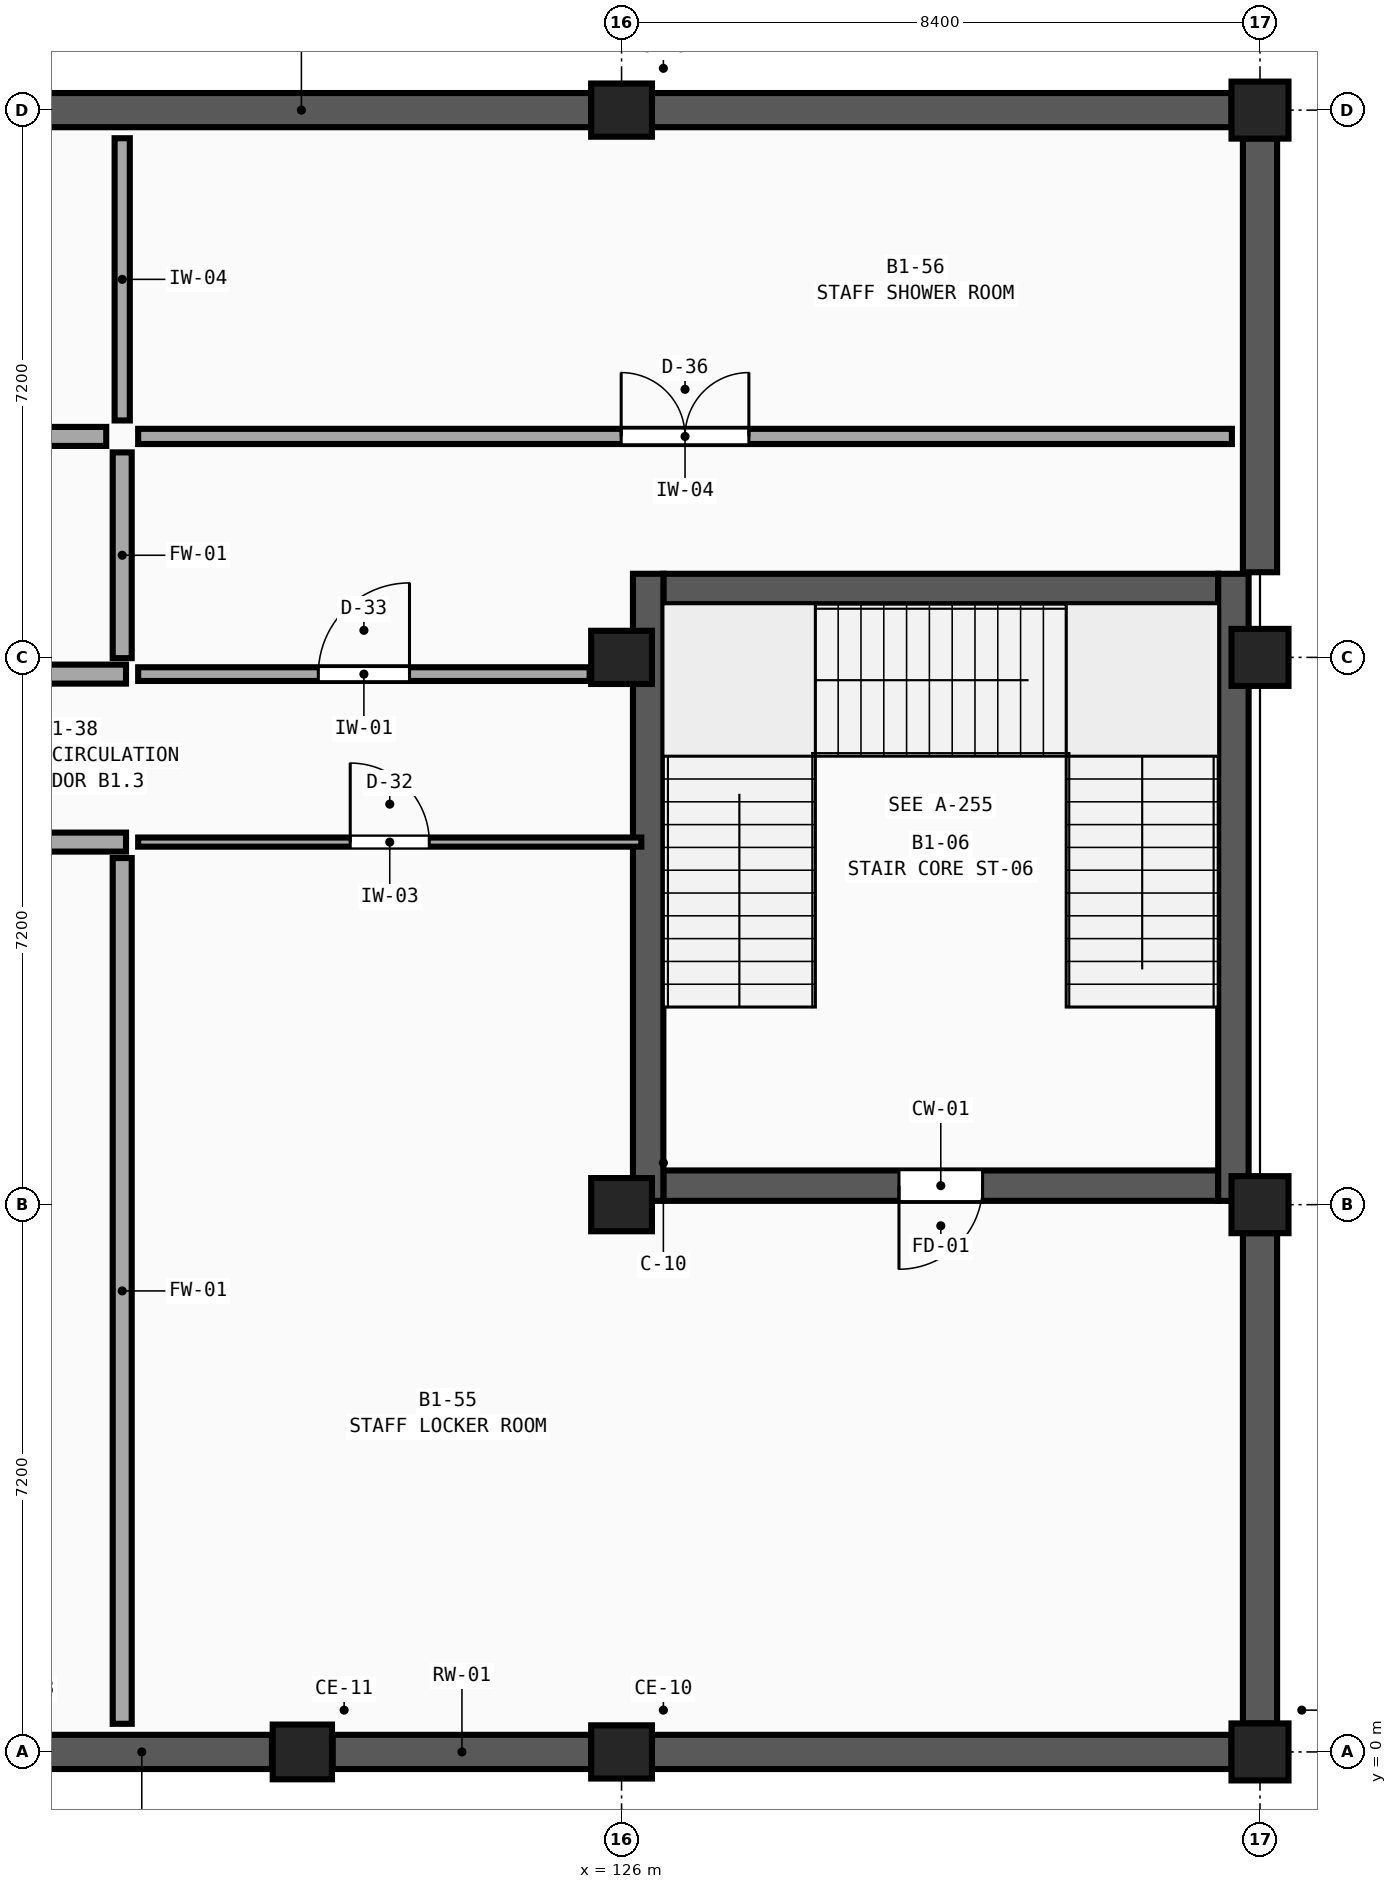
"""IFC4 building model, lengths in metres.
Left out: names, types, materials, properties, quantities, classifications, styles, units other than length and angle.
Written with IfcOpenShell. Run it as: python <this file> out.ifc"""

import sys

from ifc_helpers import new_model, si_unit, direction, frame, frame_2d, origin, origin_2d, place, context, subcontext, project, spatial, rectangle, extrude, element, fill, save


model = new_model("IFC4")
c1 = context("Model", 3, precision=1e-05, world=origin(), true_north=direction((0.0, 1.0)))
c2 = subcontext(c1, "Body", "Model", "MODEL_VIEW")
j1 = project(units=[si_unit("LENGTHUNIT", "METRE"), si_unit("PLANEANGLEUNIT", "RADIAN")], contexts=[c1])
p1 = place(None, origin())
s1 = spatial("IfcSite", under=j1, at=p1, CompositionType="ELEMENT")
p2 = place(p1, origin())
s2 = spatial("IfcBuilding", under=s1, at=p2, CompositionType="ELEMENT")
p3 = place(p2, frame((0.0, 0.0, -5.4)))
s3 = spatial("IfcBuildingStorey", under=s2, at=p3, CompositionType="ELEMENT", Elevation=-5.4)
for number, where, z_axis, x_axis in (
    (1, (126.0, 0.0, 0.0), (0.0, 0.0, 1.0), (1.0, 0.0, 0.0)),
    (2, (126.0, 7.2, 0.0), (0.0, 0.0, 1.0), (1.0, 0.0, 0.0)),
    (3, (126.0, 14.4, 0.0), (0.0, 0.0, 1.0), (1.0, 0.0, 0.0)),
    (4, (126.0, 21.6, 0.0), (0.0, 0.0, 1.0), (1.0, 0.0, 0.0)),
):
    element("IfcColumn", number, at=place(p3, frame(where, z_axis=z_axis, x_axis=x_axis)), inside=s3, PredefinedType="COLUMN", context=c2, shape_type="SweptSolid", body=[
        extrude(rectangle(XDim=0.8, YDim=0.7, at=origin_2d()), origin(), (0.0, 0.0, 1.0), 5.4),
    ])
for number, where, z_axis, x_axis in (
    (5, (134.4, 0.0, 0.0), (0.0, 0.0, 1.0), (1.0, 0.0, 0.0)),
    (6, (134.4, 7.2, 0.0), (0.0, 0.0, 1.0), (1.0, 0.0, 0.0)),
    (7, (134.4, 14.4, 0.0), (0.0, 0.0, 1.0), (1.0, 0.0, 0.0)),
    (8, (134.4, 21.6, 0.0), (0.0, 0.0, 1.0), (1.0, 0.0, 0.0)),
):
    element("IfcColumn", number, at=place(p3, frame(where, z_axis=z_axis, x_axis=x_axis)), inside=s3, PredefinedType="COLUMN", context=c2, shape_type="SweptSolid", body=[
        extrude(rectangle(XDim=0.75, YDim=0.75, at=origin_2d()), origin(), (0.0, 0.0, 1.0), 5.4),
    ])
p4 = place(p3, frame((121.8, 0.0, 0.0), z_axis=(0.0, 0.0, 1.0), x_axis=(1.0, 0.0, 0.0)))
e9 = element("IfcColumn", 9, at=p4, inside=s3, PredefinedType="PILASTER", context=c2, shape_type="SweptSolid", body=[
    extrude(rectangle(XDim=0.78, YDim=0.72, at=origin_2d()), origin(), (0.0, 0.0, 1.0), 5.4),
])
p5 = place(p3, frame((125.6, 0.0, 0.0), z_axis=(0.0, 0.0, 1.0), x_axis=(-1.0, 0.0, 0.0)))
e10 = element("IfcWall", 10, at=p5, inside=s3, PredefinedType="USERDEFINED", context=c2, shape_type="SweptSolid", body=[
    extrude(rectangle(XDim=3.4, YDim=0.45, at=frame_2d((1.7, 0.0))), origin(), (0.0, 0.0, 1.0), 4.5),
])
p6 = place(p3, frame((121.4, 0.0, 0.0), z_axis=(0.0, 0.0, 1.0), x_axis=(-1.0, 0.0, 0.0)))
e11 = element("IfcWall", 11, at=p6, inside=s3, PredefinedType="USERDEFINED", context=c2, shape_type="SweptSolid", body=[
    extrude(rectangle(XDim=3.425, YDim=0.45, at=frame_2d((1.712, 0.0))), origin(), (0.0, 0.0, 1.0), 4.5),
])
for number, where, z_axis, x_axis in (
    (12, (117.975, 21.6, 0.0), (0.0, 0.0, 1.0), (1.0, 0.0, 0.0)),
    (13, (134.025, 0.0, 0.0), (0.0, 0.0, 1.0), (-1.0, 0.0, 0.0)),
):
    element("IfcWall", number, at=place(p3, frame(where, z_axis=z_axis, x_axis=x_axis)), inside=s3, PredefinedType="USERDEFINED", context=c2, shape_type="SweptSolid", body=[
        extrude(rectangle(XDim=7.625, YDim=0.45, at=frame_2d((3.812, 0.0))), origin(), (0.0, 0.0, 1.0), 4.5),
    ])
p7 = place(p3, frame((134.4, 6.825, 0.0), z_axis=(0.0, 0.0, 1.0), x_axis=(0.0, -1.0, 0.0)))
e14 = element("IfcWall", 14, at=p7, inside=s3, PredefinedType="USERDEFINED", context=c2, shape_type="SweptSolid", body=[
    extrude(rectangle(XDim=6.45, YDim=0.45, at=frame_2d((3.225, 0.0))), origin(), (0.0, 0.0, 1.0), 4.5),
])
p8 = place(p3, frame((134.4, 21.225, 0.0), z_axis=(0.0, 0.0, 1.0), x_axis=(0.0, -1.0, 0.0)))
e15 = element("IfcWall", 15, at=p8, inside=s3, PredefinedType="USERDEFINED", context=c2, shape_type="SweptSolid", body=[
    extrude(rectangle(XDim=5.705, YDim=0.45, at=frame_2d((2.853, 0.0))), origin(), (0.0, 0.0, 1.0), 4.5),
])
p9 = place(p3, frame((126.4, 21.6, 0.0), z_axis=(0.0, 0.0, 1.0), x_axis=(1.0, 0.0, 0.0)))
e16 = element("IfcWall", 16, at=p9, inside=s3, PredefinedType="USERDEFINED", context=c2, shape_type="SweptSolid", body=[
    extrude(rectangle(XDim=7.625, YDim=0.45, at=frame_2d((3.812, 0.0))), origin(), (0.0, 0.0, 1.0), 4.5),
])
p10 = place(p3, frame((133.85, 7.45, 0.0), z_axis=(0.0, 0.0, 1.0), x_axis=(-1.0, 0.0, 0.0)))
e17 = element("IfcWall", 17, at=p10, inside=s3, PredefinedType="SHEAR", context=c2, shape_type="SweptSolid", body=[
    extrude(rectangle(XDim=7.3, YDim=0.4, at=frame_2d((3.65, 0.0))), origin(), (0.0, 0.0, 1.0), 5.4),
])
p11 = place(p10, frame((3.1, 0.0, 0.0)))
e18 = element("IfcOpeningElement", 18, at=p11, cuts=e17, PredefinedType="OPENING", context=c2, shape_type="SweptSolid", body=[
    extrude(rectangle(XDim=1.1, YDim=2.2, at=frame_2d((0.55, 1.1))), frame((0.0, 0.22, 0.0), z_axis=(0.0, -1.0, 0.0), x_axis=(1.0, 0.0, 0.0)), (0.0, 0.0, 1.0), 0.44),
])
p12 = place(p3, frame((126.55, 15.3, 0.0), z_axis=(0.0, 0.0, 1.0), x_axis=(1.0, 0.0, 0.0)))
e19 = element("IfcWall", 19, at=p12, inside=s3, PredefinedType="SHEAR", context=c2, shape_type="SweptSolid", body=[
    extrude(rectangle(XDim=7.3, YDim=0.4, at=frame_2d((3.65, 0.0))), origin(), (0.0, 0.0, 1.0), 5.4),
])
for number, where, z_axis, x_axis in (
    (20, (126.35, 15.5, 0.0), (0.0, 0.0, 1.0), (0.0, -1.0, 0.0)),
    (21, (134.05, 7.25, 0.0), (0.0, 0.0, 1.0), (0.0, 1.0, 0.0)),
):
    element("IfcWall", number, at=place(p3, frame(where, z_axis=z_axis, x_axis=x_axis)), inside=s3, PredefinedType="SHEAR", context=c2, shape_type="SweptSolid", body=[
        extrude(rectangle(XDim=8.25, YDim=0.4, at=frame_2d((4.125, 0.0))), origin(), (0.0, 0.0, 1.0), 5.4),
    ])
p13 = place(p3, frame((109.57, 11.97, 0.0), z_axis=(0.0, 0.0, 1.0), x_axis=(1.0, 0.0, 0.0)))
e22 = element("IfcWall", 22, at=p13, inside=s3, PredefinedType="SOLIDWALL", context=c2, shape_type="SweptSolid", body=[
    extrude(rectangle(XDim=9.91, YDim=0.25, at=frame_2d((4.955, 0.0))), origin(), (0.0, 0.0, 1.0), 5.05),
])
p14 = place(p13, frame((4.055, 0.0, 0.0)))
e23 = element("IfcOpeningElement", 23, at=p14, cuts=e22, PredefinedType="OPENING", context=c2, shape_type="SweptSolid", body=[
    extrude(rectangle(XDim=1.8, YDim=2.3, at=frame_2d((0.9, 1.15))), frame((0.0, 0.145, 0.0), z_axis=(0.0, -1.0, 0.0), x_axis=(1.0, 0.0, 0.0)), (0.0, 0.0, 1.0), 0.29),
])
p15 = place(p3, frame((117.995, 14.18, 0.0), z_axis=(0.0, 0.0, 1.0), x_axis=(1.0, 0.0, 0.0)))
e24 = element("IfcWall", 24, at=p15, inside=s3, PredefinedType="SOLIDWALL", context=c2, shape_type="SweptSolid", body=[
    extrude(rectangle(XDim=1.485, YDim=0.25, at=frame_2d((0.742, 0.0))), origin(), (0.0, 0.0, 1.0), 4.55),
])
p16 = place(p3, frame((119.64, 11.97, 0.0), z_axis=(0.0, 0.0, 1.0), x_axis=(1.0, 0.0, 0.0)))
e25 = element("IfcWall", 25, at=p16, inside=s3, PredefinedType="PARTITIONING", context=c2, shape_type="SweptSolid", body=[
    extrude(rectangle(XDim=6.62, YDim=0.12, at=frame_2d((3.31, 0.0))), origin(), (0.0, 0.0, 1.0), 5.05),
])
p17 = place(p16, frame((2.79, 0.0, 0.0)))
e26 = element("IfcOpeningElement", 26, at=p17, cuts=e25, PredefinedType="OPENING", context=c2, shape_type="SweptSolid", body=[
    extrude(rectangle(XDim=1.04, YDim=2.45, at=frame_2d((0.52, 1.225))), frame((0.0, 0.08, 0.0), z_axis=(0.0, -1.0, 0.0), x_axis=(1.0, 0.0, 0.0)), (0.0, 0.0, 1.0), 0.16),
])
p18 = place(p3, frame((119.64, 14.18, 0.0), z_axis=(0.0, 0.0, 1.0), x_axis=(1.0, 0.0, 0.0)))
e27 = element("IfcWall", 27, at=p18, inside=s3, PredefinedType="PARTITIONING", context=c2, shape_type="SweptSolid", body=[
    extrude(rectangle(XDim=5.94, YDim=0.18, at=frame_2d((2.97, 0.0))), origin(), (0.0, 0.0, 1.0), 4.55),
])
p19 = place(p18, frame((2.37, 0.0, 0.0)))
e28 = element("IfcOpeningElement", 28, at=p19, cuts=e27, PredefinedType="OPENING", context=c2, shape_type="SweptSolid", body=[
    extrude(rectangle(XDim=1.2, YDim=2.45, at=frame_2d((0.6, 1.225))), frame((0.0, 0.11, 0.0), z_axis=(0.0, -1.0, 0.0), x_axis=(1.0, 0.0, 0.0)), (0.0, 0.0, 1.0), 0.22),
])
p20 = place(p3, frame((103.07, 17.307, 0.0), z_axis=(0.0, 0.0, 1.0), x_axis=(1.0, 0.0, 0.0)))
e29 = element("IfcWall", 29, at=p20, inside=s3, PredefinedType="SOLIDWALL", context=c2, shape_type="SweptSolid", body=[
    extrude(rectangle(XDim=16.15, YDim=0.25, at=frame_2d((8.075, 0.0))), origin(), (0.0, 0.0, 1.0), 5.05),
])
p21 = place(p20, frame((7.175, 0.0, 0.0)))
e30 = element("IfcOpeningElement", 30, at=p21, cuts=e29, PredefinedType="OPENING", context=c2, shape_type="SweptSolid", body=[
    extrude(rectangle(XDim=1.8, YDim=2.3, at=frame_2d((0.9, 1.15))), frame((0.0, 0.145, 0.0), z_axis=(0.0, -1.0, 0.0), x_axis=(1.0, 0.0, 0.0)), (0.0, 0.0, 1.0), 0.29),
])
p22 = place(p3, frame((119.64, 17.307, 0.0), z_axis=(0.0, 0.0, 1.0), x_axis=(1.0, 0.0, 0.0)))
e31 = element("IfcWall", 31, at=p22, inside=s3, PredefinedType="PLUMBINGWALL", context=c2, shape_type="SweptSolid", body=[
    extrude(rectangle(XDim=14.39, YDim=0.2, at=frame_2d((7.195, 0.0))), origin(), (0.0, 0.0, 1.0), 5.05),
])
p23 = place(p22, frame((6.355, 0.0, 0.0)))
e32 = element("IfcOpeningElement", 32, at=p23, cuts=e31, PredefinedType="OPENING", context=c2, shape_type="SweptSolid", body=[
    extrude(rectangle(XDim=1.68, YDim=2.45, at=frame_2d((0.84, 1.225))), frame((0.0, 0.12, 0.0), z_axis=(0.0, -1.0, 0.0), x_axis=(1.0, 0.0, 0.0)), (0.0, 0.0, 1.0), 0.24),
])
p24 = place(p3, frame((119.43, 0.37, 0.0), z_axis=(0.0, 0.0, 1.0), x_axis=(0.0, 1.0, 0.0)))
e33 = element("IfcWall", 33, at=p24, inside=s3, PredefinedType="SOLIDWALL", context=c2, shape_type="SweptSolid", body=[
    extrude(rectangle(XDim=11.39, YDim=0.25, at=frame_2d((5.695, 0.0))), origin(), (0.0, 0.0, 1.0), 5.05),
])
p25 = place(p3, frame((119.43, 17.517, 0.0), z_axis=(0.0, 0.0, 1.0), x_axis=(0.0, 1.0, 0.0)))
e34 = element("IfcWall", 34, at=p25, inside=s3, PredefinedType="PLUMBINGWALL", context=c2, shape_type="SweptSolid", body=[
    extrude(rectangle(XDim=3.713, YDim=0.2, at=frame_2d((1.856, 0.0))), origin(), (0.0, 0.0, 1.0), 5.05),
])
p26 = place(p3, frame((119.43, 14.39, 0.0), z_axis=(0.0, 0.0, 1.0), x_axis=(0.0, 1.0, 0.0)))
e35 = element("IfcWall", 35, at=p26, inside=s3, PredefinedType="SOLIDWALL", context=c2, shape_type="SweptSolid", body=[
    extrude(rectangle(XDim=2.707, YDim=0.25, at=frame_2d((1.354, 0.0))), origin(), (0.0, 0.0, 1.0), 5.05),
])
p27 = place(p11, origin())
e36 = element("IfcDoor", 36, at=p27, inside=s3, OperationType="SINGLE_SWING_RIGHT", PredefinedType="DOOR", context=c2, shape_type="SweptSolid", body=[
    extrude(rectangle(XDim=1.1, YDim=2.2, at=frame_2d((0.55, 1.1))), frame((0.0, 0.025, 0.0), z_axis=(0.0, -1.0, 0.0), x_axis=(1.0, 0.0, 0.0)), (0.0, 0.0, 1.0), 0.05),
])
fill(e18, e36)
p28 = place(p17, origin())
e37 = element("IfcDoor", 37, at=p28, inside=s3, OperationType="SINGLE_SWING_LEFT", PredefinedType="DOOR", context=c2, shape_type="SweptSolid", body=[
    extrude(rectangle(XDim=1.04, YDim=2.45, at=frame_2d((0.52, 1.225))), frame((0.0, 0.025, 0.0), z_axis=(0.0, -1.0, 0.0), x_axis=(1.0, 0.0, 0.0)), (0.0, 0.0, 1.0), 0.05),
])
fill(e26, e37)
p29 = place(p19, origin())
e38 = element("IfcDoor", 38, at=p29, inside=s3, OperationType="SINGLE_SWING_RIGHT", PredefinedType="DOOR", context=c2, shape_type="SweptSolid", body=[
    extrude(rectangle(XDim=1.2, YDim=2.45, at=frame_2d((0.6, 1.225))), frame((0.0, 0.025, 0.0), z_axis=(0.0, -1.0, 0.0), x_axis=(1.0, 0.0, 0.0)), (0.0, 0.0, 1.0), 0.05),
])
fill(e28, e38)
p30 = place(p23, origin())
e39 = element("IfcDoor", 39, at=p30, inside=s3, OperationType="DOUBLE_DOOR_SINGLE_SWING", PredefinedType="DOOR", context=c2, shape_type="SweptSolid", body=[
    extrude(rectangle(XDim=1.68, YDim=2.45, at=frame_2d((0.84, 1.225))), frame((0.0, 0.025, 0.0), z_axis=(0.0, -1.0, 0.0), x_axis=(1.0, 0.0, 0.0)), (0.0, 0.0, 1.0), 0.05),
])
fill(e32, e39)
save(model, sys.argv[1])
